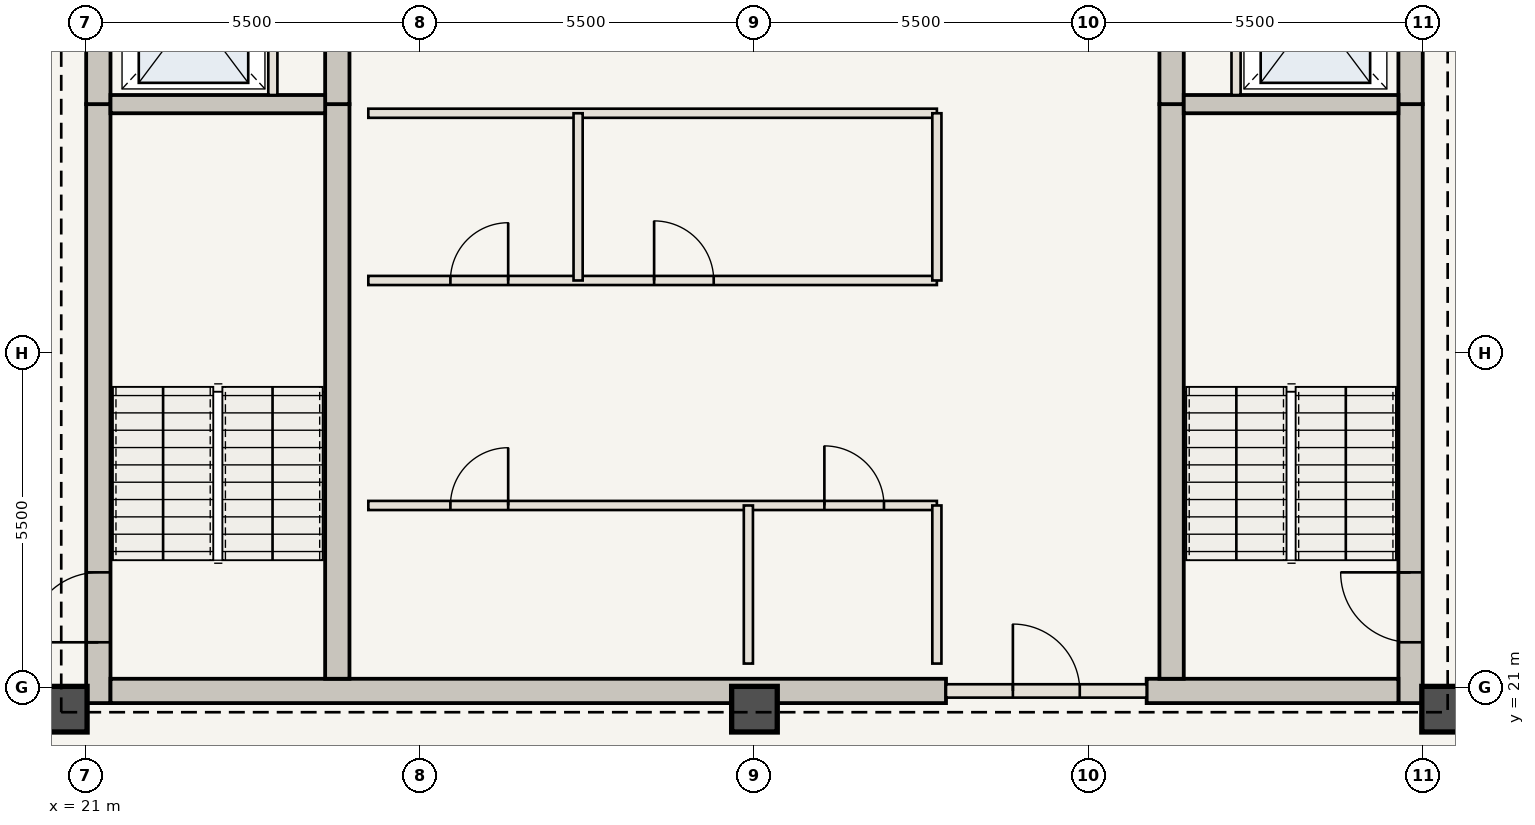
"""IFC4 building model, lengths in metres.
Left out: names, types, materials, properties, quantities, classifications, styles, units other than length and angle.
Written with IfcOpenShell. Run it as: python <this file> out.ifc"""

import sys

from ifc_helpers import new_model, si_unit, direction, frame, frame_2d, origin, origin_2d, place, context, subcontext, project, spatial, rectangle, extrude, element, fill, save


model = new_model("IFC4")
c1 = context("Model", 3, precision=1e-05, world=origin(), true_north=direction((0.0, 1.0)))
c2 = subcontext(c1, "Body", "Model", "MODEL_VIEW")
j1 = project(units=[si_unit("LENGTHUNIT", "METRE"), si_unit("PLANEANGLEUNIT", "RADIAN")], contexts=[c1])
p1 = place(None, origin())
s1 = spatial("IfcSite", under=j1, at=p1, CompositionType="ELEMENT")
p2 = place(p1, origin())
s2 = spatial("IfcBuilding", under=s1, at=p2, CompositionType="ELEMENT")
p3 = place(p2, frame((0.0, 0.0, 273.7)))
s3 = spatial("IfcBuildingStorey", under=s2, at=p3, CompositionType="ELEMENT", Elevation=273.7)
p4 = place(p3, frame((21.21, 20.75, 0.0), z_axis=(0.0, 0.0, 1.0), x_axis=(0.0, 1.0, 0.0)))
e1 = element("IfcWall", 1, at=p4, inside=s3, PredefinedType="SHEAR", context=c2, shape_type="SweptSolid", body=[
    extrude(rectangle(XDim=9.85, YDim=0.4, at=frame_2d((4.925, 0.0))), origin(), (0.0, 0.0, 1.0), 3.85),
])
p5 = place(p4, frame((1.0, 0.0, 0.0)))
e2 = element("IfcOpeningElement", 2, at=p5, cuts=e1, PredefinedType="OPENING", context=c2, shape_type="SweptSolid", body=[
    extrude(rectangle(XDim=1.15, YDim=2.15, at=frame_2d((0.575, 1.075))), frame((0.0, 0.21, 0.0), z_axis=(0.0, -1.0, 0.0), x_axis=(1.0, 0.0, 0.0)), (0.0, 0.0, 1.0), 0.42),
])
p6 = place(p3, frame((21.21, 30.6, 0.0), z_axis=(0.0, 0.0, 1.0), x_axis=(0.0, 1.0, 0.0)))
e3 = element("IfcWall", 3, at=p6, inside=s3, PredefinedType="SHEAR", context=c2, shape_type="SweptSolid", body=[
    extrude(rectangle(XDim=12.6, YDim=0.4, at=frame_2d((6.3, 0.0))), origin(), (0.0, 0.0, 1.0), 3.85),
])
p7 = place(p6, frame((4.2, 0.0, 0.0)))
e4 = element("IfcOpeningElement", 4, at=p7, cuts=e3, PredefinedType="OPENING", context=c2, shape_type="SweptSolid", body=[
    extrude(rectangle(XDim=1.1, YDim=2.15, at=frame_2d((0.55, 1.075))), frame((0.0, 0.21, 0.0), z_axis=(0.0, -1.0, 0.0), x_axis=(1.0, 0.0, 0.0)), (0.0, 0.0, 1.0), 0.42),
])
p8 = place(p6, frame((8.05, 0.0, 0.0)))
e5 = element("IfcOpeningElement", 5, at=p8, cuts=e3, PredefinedType="OPENING", context=c2, shape_type="SweptSolid", body=[
    extrude(rectangle(XDim=0.92, YDim=2.1, at=frame_2d((0.46, 1.05))), frame((0.0, 0.21, 0.0), z_axis=(0.0, -1.0, 0.0), x_axis=(1.0, 0.0, 0.0)), (0.0, 0.0, 1.0), 0.42),
])
p9 = place(p6, frame((9.45, 0.0, 0.0)))
e6 = element("IfcOpeningElement", 6, at=p9, cuts=e3, PredefinedType="OPENING", context=c2, shape_type="SweptSolid", body=[
    extrude(rectangle(XDim=0.88, YDim=2.1, at=frame_2d((0.44, 1.05))), frame((0.0, 0.21, 0.0), z_axis=(0.0, -1.0, 0.0), x_axis=(1.0, 0.0, 0.0)), (0.0, 0.0, 1.0), 0.42),
])
p10 = place(p6, frame((10.85, 0.0, 0.0)))
e7 = element("IfcOpeningElement", 7, at=p10, cuts=e3, PredefinedType="OPENING", context=c2, shape_type="SweptSolid", body=[
    extrude(rectangle(XDim=0.88, YDim=2.1, at=frame_2d((0.44, 1.05))), frame((0.0, 0.21, 0.0), z_axis=(0.0, -1.0, 0.0), x_axis=(1.0, 0.0, 0.0)), (0.0, 0.0, 1.0), 0.42),
])
p11 = place(p3, frame((42.79, 20.75, 0.0), z_axis=(0.0, 0.0, 1.0), x_axis=(0.0, 1.0, 0.0)))
e8 = element("IfcWall", 8, at=p11, inside=s3, PredefinedType="SHEAR", context=c2, shape_type="SweptSolid", body=[
    extrude(rectangle(XDim=9.85, YDim=0.4, at=frame_2d((4.925, 0.0))), origin(), (0.0, 0.0, 1.0), 3.85),
])
p12 = place(p11, frame((1.0, 0.0, 0.0)))
e9 = element("IfcOpeningElement", 9, at=p12, cuts=e8, PredefinedType="OPENING", context=c2, shape_type="SweptSolid", body=[
    extrude(rectangle(XDim=1.15, YDim=2.15, at=frame_2d((0.575, 1.075))), frame((0.0, 0.21, 0.0), z_axis=(0.0, -1.0, 0.0), x_axis=(1.0, 0.0, 0.0)), (0.0, 0.0, 1.0), 0.42),
])
p13 = place(p3, frame((42.79, 30.6, 0.0), z_axis=(0.0, 0.0, 1.0), x_axis=(0.0, 1.0, 0.0)))
e10 = element("IfcWall", 10, at=p13, inside=s3, PredefinedType="SHEAR", context=c2, shape_type="SweptSolid", body=[
    extrude(rectangle(XDim=12.6, YDim=0.4, at=frame_2d((6.3, 0.0))), origin(), (0.0, 0.0, 1.0), 3.85),
])
p14 = place(p13, frame((4.2, 0.0, 0.0)))
e11 = element("IfcOpeningElement", 11, at=p14, cuts=e10, PredefinedType="OPENING", context=c2, shape_type="SweptSolid", body=[
    extrude(rectangle(XDim=1.1, YDim=2.15, at=frame_2d((0.55, 1.075))), frame((0.0, 0.21, 0.0), z_axis=(0.0, -1.0, 0.0), x_axis=(1.0, 0.0, 0.0)), (0.0, 0.0, 1.0), 0.42),
])
p15 = place(p13, frame((9.2, 0.0, 0.0)))
e12 = element("IfcOpeningElement", 12, at=p15, cuts=e10, PredefinedType="OPENING", context=c2, shape_type="SweptSolid", body=[
    extrude(rectangle(XDim=0.92, YDim=2.1, at=frame_2d((0.46, 1.05))), frame((0.0, 0.21, 0.0), z_axis=(0.0, -1.0, 0.0), x_axis=(1.0, 0.0, 0.0)), (0.0, 0.0, 1.0), 0.42),
])
p16 = place(p3, frame((21.41, 20.95, 0.0), z_axis=(0.0, 0.0, 1.0), x_axis=(1.0, 0.0, 0.0)))
e13 = element("IfcWall", 13, at=p16, inside=s3, PredefinedType="SHEAR", context=c2, shape_type="SweptSolid", body=[
    extrude(rectangle(XDim=13.74, YDim=0.4, at=frame_2d((6.87, 0.0))), origin(), (0.0, 0.0, 1.0), 3.85),
])
p17 = place(p3, frame((38.45, 20.95, 0.0), z_axis=(0.0, 0.0, 1.0), x_axis=(1.0, 0.0, 0.0)))
e14 = element("IfcWall", 14, at=p17, inside=s3, PredefinedType="SHEAR", context=c2, shape_type="SweptSolid", body=[
    extrude(rectangle(XDim=4.14, YDim=0.4, at=frame_2d((2.07, 0.0))), origin(), (0.0, 0.0, 1.0), 3.85),
])
p18 = place(p3, frame((25.14, 21.15, 0.0), z_axis=(0.0, 0.0, 1.0), x_axis=(0.0, 1.0, 0.0)))
e15 = element("IfcWall", 15, at=p18, inside=s3, PredefinedType="SHEAR", context=c2, shape_type="SweptSolid", body=[
    extrude(rectangle(XDim=9.45, YDim=0.4, at=frame_2d((4.725, 0.0))), origin(), (0.0, 0.0, 1.0), 3.85),
])
p19 = place(p3, frame((25.14, 30.6, 0.0), z_axis=(0.0, 0.0, 1.0), x_axis=(0.0, 1.0, 0.0)))
e16 = element("IfcWall", 16, at=p19, inside=s3, PredefinedType="SHEAR", context=c2, shape_type="SweptSolid", body=[
    extrude(rectangle(XDim=12.2, YDim=0.4, at=frame_2d((6.1, 0.0))), origin(), (0.0, 0.0, 1.0), 3.85),
])
p20 = place(p19, frame((6.25, 0.0, 0.0)))
e17 = element("IfcOpeningElement", 17, at=p20, cuts=e16, PredefinedType="OPENING", context=c2, shape_type="SweptSolid", body=[
    extrude(rectangle(XDim=1.1, YDim=2.15, at=frame_2d((0.55, 1.075))), frame((0.0, 0.21, 0.0), z_axis=(0.0, -1.0, 0.0), x_axis=(1.0, 0.0, 0.0)), (0.0, 0.0, 1.0), 0.42),
])
p21 = place(p3, frame((38.86, 21.15, 0.0), z_axis=(0.0, 0.0, 1.0), x_axis=(0.0, 1.0, 0.0)))
e18 = element("IfcWall", 18, at=p21, inside=s3, PredefinedType="SHEAR", context=c2, shape_type="SweptSolid", body=[
    extrude(rectangle(XDim=9.45, YDim=0.4, at=frame_2d((4.725, 0.0))), origin(), (0.0, 0.0, 1.0), 3.85),
])
p22 = place(p3, frame((38.86, 30.6, 0.0), z_axis=(0.0, 0.0, 1.0), x_axis=(0.0, 1.0, 0.0)))
e19 = element("IfcWall", 19, at=p22, inside=s3, PredefinedType="SHEAR", context=c2, shape_type="SweptSolid", body=[
    extrude(rectangle(XDim=12.2, YDim=0.4, at=frame_2d((6.1, 0.0))), origin(), (0.0, 0.0, 1.0), 3.85),
])
for number, where, z_axis, x_axis in (
    (20, (20.65, 20.65, 0.0), (0.0, 0.0, 1.0), (1.0, 0.0, 0.0)),
    (21, (32.0, 20.65, 0.0), (0.0, 0.0, 1.0), (1.0, 0.0, 0.0)),
    (22, (43.35, 20.65, 0.0), (0.0, 0.0, 1.0), (1.0, 0.0, 0.0)),
):
    element("IfcColumn", number, at=place(p3, frame(where, z_axis=z_axis, x_axis=x_axis)), inside=s3, PredefinedType="COLUMN", context=c2, shape_type="SweptSolid", body=[
        extrude(rectangle(XDim=0.75, YDim=0.75, at=origin_2d()), origin(), (0.0, 0.0, 1.0), 3.85),
    ])
for number, where, z_axis, x_axis in (
    (23, (21.41, 30.6, 0.0), (0.0, 0.0, 1.0), (1.0, 0.0, 0.0)),
    (24, (39.06, 30.6, 0.0), (0.0, 0.0, 1.0), (1.0, 0.0, 0.0)),
):
    element("IfcWall", number, at=place(p3, frame(where, z_axis=z_axis, x_axis=x_axis)), inside=s3, PredefinedType="SHEAR", context=c2, shape_type="SweptSolid", body=[
        extrude(rectangle(XDim=3.53, YDim=0.3, at=frame_2d((1.765, 0.0))), origin(), (0.0, 0.0, 1.0), 3.685),
    ])
for number, where, z_axis, x_axis in (
    (25, (24.08, 30.75, 0.0), (0.0, 0.0, 1.0), (0.0, 1.0, 0.0)),
    (26, (39.92, 30.75, 0.0), (0.0, 0.0, 1.0), (0.0, 1.0, 0.0)),
):
    element("IfcWall", number, at=place(p3, frame(where, z_axis=z_axis, x_axis=x_axis)), inside=s3, PredefinedType="STANDARD", context=c2, shape_type="SweptSolid", body=[
        extrude(rectangle(XDim=2.65, YDim=0.15, at=frame_2d((1.325, 0.0))), origin(), (0.0, 0.0, 1.0), 3.685),
    ])
p23 = place(p3, frame((35.15, 20.95, 0.0), z_axis=(0.0, 0.0, 1.0), x_axis=(1.0, 0.0, 0.0)))
e27 = element("IfcWall", 27, at=p23, inside=s3, PredefinedType="STANDARD", context=c2, shape_type="SweptSolid", body=[
    extrude(rectangle(XDim=3.3, YDim=0.22, at=frame_2d((1.65, 0.0))), origin(), (0.0, 0.0, 1.0), 3.685),
])
p24 = place(p23, frame((1.1, 0.0, 0.0)))
e28 = element("IfcOpeningElement", 28, at=p24, cuts=e27, PredefinedType="OPENING", context=c2, shape_type="SweptSolid", body=[
    extrude(rectangle(XDim=1.1, YDim=2.15, at=frame_2d((0.55, 1.075))), frame((0.0, 0.12, 0.0), z_axis=(0.0, -1.0, 0.0), x_axis=(1.0, 0.0, 0.0)), (0.0, 0.0, 1.0), 0.24),
])
p25 = place(p3, frame((25.65, 24.0, 0.0), z_axis=(0.0, 0.0, 1.0), x_axis=(1.0, 0.0, 0.0)))
e29 = element("IfcWall", 29, at=p25, inside=s3, PredefinedType="STANDARD", context=c2, shape_type="SweptSolid", body=[
    extrude(rectangle(XDim=9.35, YDim=0.15, at=frame_2d((4.675, 0.0))), origin(), (0.0, 0.0, 1.0), 3.685),
])
p26 = place(p25, frame((1.35, 0.0, 0.0)))
e30 = element("IfcOpeningElement", 30, at=p26, cuts=e29, PredefinedType="OPENING", context=c2, shape_type="SweptSolid", body=[
    extrude(rectangle(XDim=0.95, YDim=2.15, at=frame_2d((0.475, 1.075))), frame((0.0, 0.085, 0.0), z_axis=(0.0, -1.0, 0.0), x_axis=(1.0, 0.0, 0.0)), (0.0, 0.0, 1.0), 0.17),
])
p27 = place(p25, frame((7.5, 0.0, 0.0)))
e31 = element("IfcOpeningElement", 31, at=p27, cuts=e29, PredefinedType="OPENING", context=c2, shape_type="SweptSolid", body=[
    extrude(rectangle(XDim=0.98, YDim=2.2, at=frame_2d((0.49, 1.1))), frame((0.0, 0.085, 0.0), z_axis=(0.0, -1.0, 0.0), x_axis=(1.0, 0.0, 0.0)), (0.0, 0.0, 1.0), 0.17),
])
for number, where, z_axis, x_axis in (
    (32, (31.9, 21.4, 0.0), (0.0, 0.0, 1.0), (0.0, 1.0, 0.0)),
    (33, (35.0, 21.4, 0.0), (0.0, 0.0, 1.0), (0.0, 1.0, 0.0)),
):
    element("IfcWall", number, at=place(p3, frame(where, z_axis=z_axis, x_axis=x_axis)), inside=s3, PredefinedType="STANDARD", context=c2, shape_type="SweptSolid", body=[
        extrude(rectangle(XDim=2.6, YDim=0.15, at=frame_2d((1.3, 0.0))), origin(), (0.0, 0.0, 1.0), 3.685),
    ])
p28 = place(p3, frame((25.65, 27.7, 0.0), z_axis=(0.0, 0.0, 1.0), x_axis=(1.0, 0.0, 0.0)))
e34 = element("IfcWall", 34, at=p28, inside=s3, PredefinedType="STANDARD", context=c2, shape_type="SweptSolid", body=[
    extrude(rectangle(XDim=9.35, YDim=0.15, at=frame_2d((4.675, 0.0))), origin(), (0.0, 0.0, 1.0), 3.685),
])
p29 = place(p28, frame((1.35, 0.0, 0.0)))
e35 = element("IfcOpeningElement", 35, at=p29, cuts=e34, PredefinedType="OPENING", context=c2, shape_type="SweptSolid", body=[
    extrude(rectangle(XDim=0.95, YDim=2.15, at=frame_2d((0.475, 1.075))), frame((0.0, 0.085, 0.0), z_axis=(0.0, -1.0, 0.0), x_axis=(1.0, 0.0, 0.0)), (0.0, 0.0, 1.0), 0.17),
])
p30 = place(p28, frame((4.7, 0.0, 0.0)))
e36 = element("IfcOpeningElement", 36, at=p30, cuts=e34, PredefinedType="OPENING", context=c2, shape_type="SweptSolid", body=[
    extrude(rectangle(XDim=0.98, YDim=2.2, at=frame_2d((0.49, 1.1))), frame((0.0, 0.085, 0.0), z_axis=(0.0, -1.0, 0.0), x_axis=(1.0, 0.0, 0.0)), (0.0, 0.0, 1.0), 0.17),
])
p31 = place(p3, frame((25.65, 30.45, 0.0), z_axis=(0.0, 0.0, 1.0), x_axis=(1.0, 0.0, 0.0)))
e37 = element("IfcWall", 37, at=p31, inside=s3, PredefinedType="STANDARD", context=c2, shape_type="SweptSolid", body=[
    extrude(rectangle(XDim=9.35, YDim=0.15, at=frame_2d((4.675, 0.0))), origin(), (0.0, 0.0, 1.0), 3.685),
])
for number, where, z_axis, x_axis in (
    (38, (29.1, 27.7, 0.0), (0.0, 0.0, 1.0), (0.0, 1.0, 0.0)),
    (39, (35.0, 27.7, 0.0), (0.0, 0.0, 1.0), (0.0, 1.0, 0.0)),
):
    element("IfcWall", number, at=place(p3, frame(where, z_axis=z_axis, x_axis=x_axis)), inside=s3, PredefinedType="STANDARD", context=c2, shape_type="SweptSolid", body=[
        extrude(rectangle(XDim=2.75, YDim=0.15, at=frame_2d((1.375, 0.0))), origin(), (0.0, 0.0, 1.0), 3.685),
    ])
p32 = place(p5, origin())
e40 = element("IfcDoor", 40, at=p32, inside=s3, OperationType="SINGLE_SWING_LEFT", PredefinedType="DOOR", context=c2, shape_type="SweptSolid", body=[
    extrude(rectangle(XDim=1.15, YDim=2.15, at=frame_2d((0.575, 1.075))), frame((0.0, 0.025, 0.0), z_axis=(0.0, -1.0, 0.0), x_axis=(1.0, 0.0, 0.0)), (0.0, 0.0, 1.0), 0.05),
])
fill(e2, e40)
p33 = place(p12, origin())
e41 = element("IfcDoor", 41, at=p33, inside=s3, OperationType="SINGLE_SWING_RIGHT", PredefinedType="DOOR", context=c2, shape_type="SweptSolid", body=[
    extrude(rectangle(XDim=1.15, YDim=2.15, at=frame_2d((0.575, 1.075))), frame((0.0, 0.025, 0.0), z_axis=(0.0, -1.0, 0.0), x_axis=(1.0, 0.0, 0.0)), (0.0, 0.0, 1.0), 0.05),
])
fill(e9, e41)
p34 = place(p24, origin())
e42 = element("IfcDoor", 42, at=p34, inside=s3, OperationType="SINGLE_SWING_LEFT", PredefinedType="DOOR", context=c2, shape_type="SweptSolid", body=[
    extrude(rectangle(XDim=1.1, YDim=2.15, at=frame_2d((0.55, 1.075))), frame((0.0, 0.025, 0.0), z_axis=(0.0, -1.0, 0.0), x_axis=(1.0, 0.0, 0.0)), (0.0, 0.0, 1.0), 0.05),
])
fill(e28, e42)
p35 = place(p26, origin())
e43 = element("IfcDoor", 43, at=p35, inside=s3, OperationType="SINGLE_SWING_RIGHT", PredefinedType="DOOR", context=c2, shape_type="SweptSolid", body=[
    extrude(rectangle(XDim=0.95, YDim=2.15, at=frame_2d((0.475, 1.075))), frame((0.0, 0.025, 0.0), z_axis=(0.0, -1.0, 0.0), x_axis=(1.0, 0.0, 0.0)), (0.0, 0.0, 1.0), 0.05),
])
fill(e30, e43)
p36 = place(p27, origin())
e44 = element("IfcDoor", 44, at=p36, inside=s3, OperationType="SINGLE_SWING_LEFT", PredefinedType="DOOR", context=c2, shape_type="SweptSolid", body=[
    extrude(rectangle(XDim=0.98, YDim=2.2, at=frame_2d((0.49, 1.1))), frame((0.0, 0.025, 0.0), z_axis=(0.0, -1.0, 0.0), x_axis=(1.0, 0.0, 0.0)), (0.0, 0.0, 1.0), 0.05),
])
fill(e31, e44)
p37 = place(p29, origin())
e45 = element("IfcDoor", 45, at=p37, inside=s3, OperationType="SINGLE_SWING_RIGHT", PredefinedType="DOOR", context=c2, shape_type="SweptSolid", body=[
    extrude(rectangle(XDim=0.95, YDim=2.15, at=frame_2d((0.475, 1.075))), frame((0.0, 0.025, 0.0), z_axis=(0.0, -1.0, 0.0), x_axis=(1.0, 0.0, 0.0)), (0.0, 0.0, 1.0), 0.05),
])
fill(e35, e45)
p38 = place(p30, origin())
e46 = element("IfcDoor", 46, at=p38, inside=s3, OperationType="SINGLE_SWING_LEFT", PredefinedType="DOOR", context=c2, shape_type="SweptSolid", body=[
    extrude(rectangle(XDim=0.98, YDim=2.2, at=frame_2d((0.49, 1.1))), frame((0.0, 0.025, 0.0), z_axis=(0.0, -1.0, 0.0), x_axis=(1.0, 0.0, 0.0)), (0.0, 0.0, 1.0), 0.05),
])
fill(e36, e46)
save(model, sys.argv[1])
